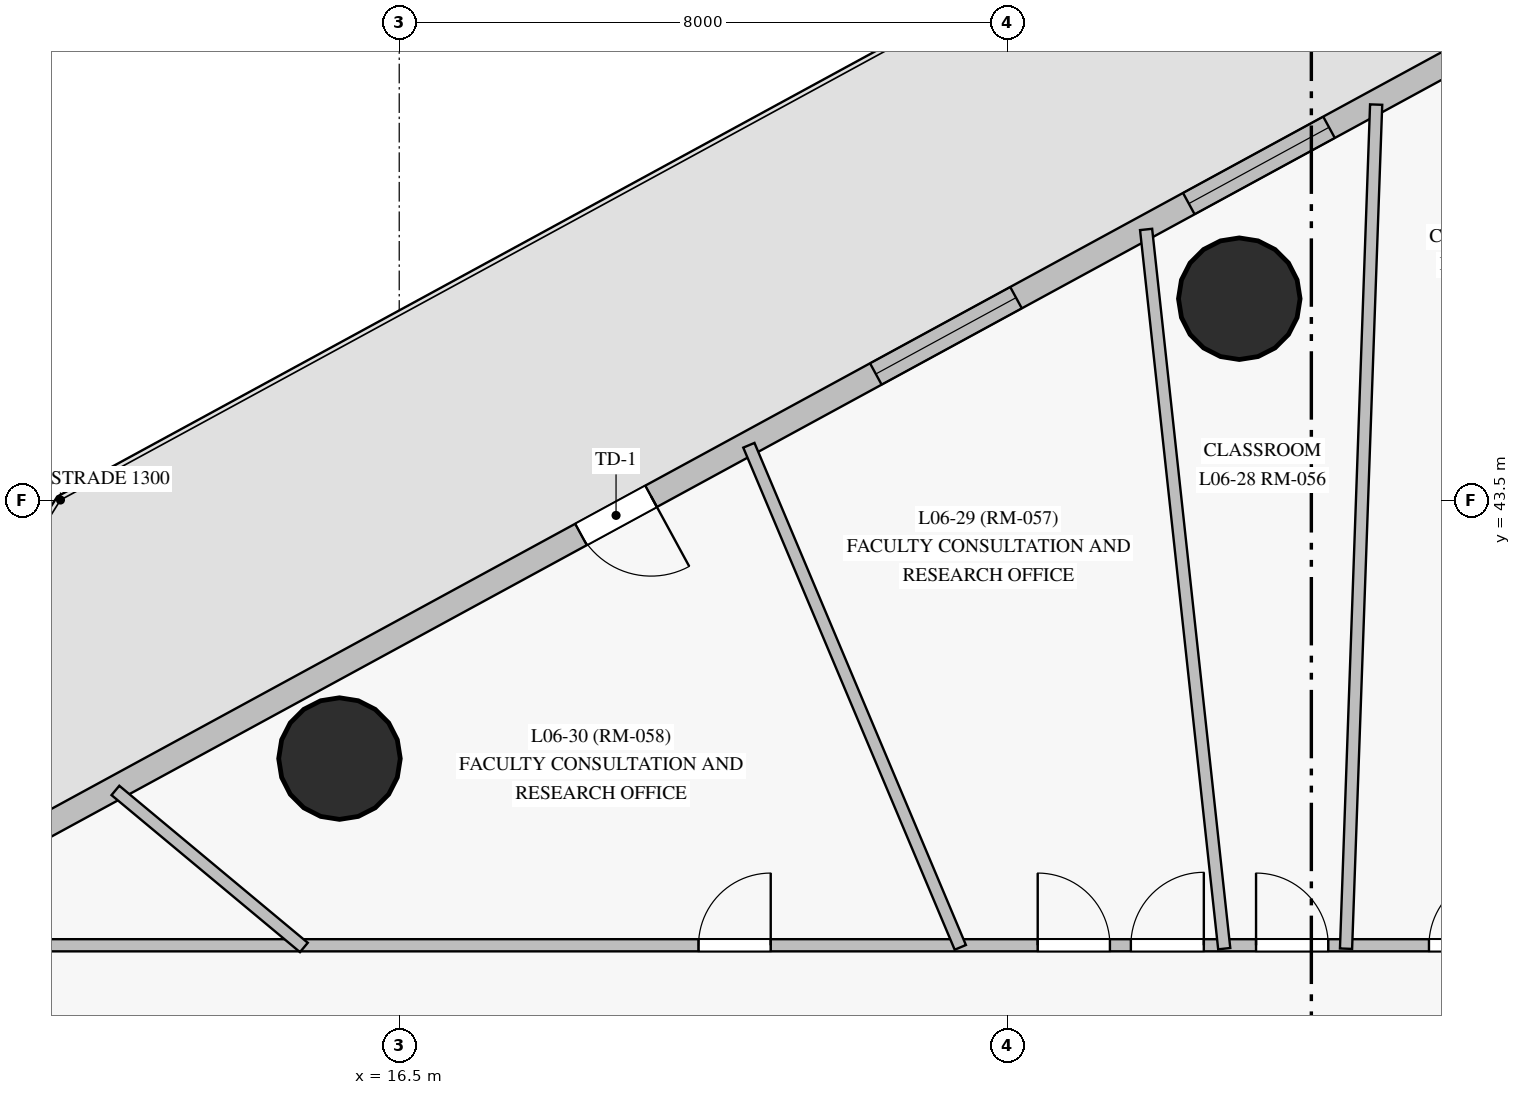
"""IFC4 building model, lengths in metres.
Left out: names, types, materials, properties, quantities, classifications, styles, units other than length and angle.
Written with IfcOpenShell. Run it as: python <this file> out.ifc"""

import sys

from ifc_helpers import new_model, si_unit, direction, frame, frame_2d, origin, origin_with_axes, origin_2d, place, context, subcontext, project, spatial, rectangle, circle, extrude, source, transform, mapped, element, fill, save


model = new_model("IFC4")
c1 = context("Model", 3, precision=1e-05, world=origin(), true_north=direction((0.0, 1.0)))
c2 = subcontext(c1, "Body", "Model", "MODEL_VIEW")
j1 = project(units=[si_unit("LENGTHUNIT", "METRE"), si_unit("PLANEANGLEUNIT", "RADIAN")], contexts=[c1])
p1 = place(None, origin())
s1 = spatial("IfcSite", under=j1, at=p1, CompositionType="ELEMENT")
p2 = place(p1, origin())
s2 = spatial("IfcBuilding", under=s1, at=p2, CompositionType="ELEMENT")
p3 = place(p2, frame((0.0, 0.0, 26.5)))
s3 = spatial("IfcBuildingStorey", under=s2, at=p3, CompositionType="ELEMENT", Elevation=26.5)
m1 = source(origin_with_axes(), c2, "Body", "SweptSolid", [
    extrude(circle(Radius=0.8, at=origin_2d()), origin(), (0.0, 0.0, 1.0), 3.6),
])
for number, where, z_axis, x_axis in (
    (1, (27.552, 46.156, 0.0), (0.0, 0.0, 1.0), (1.0, 0.0, 0.0)),
    (2, (15.714, 40.106, 0.0), (0.0, 0.0, 1.0), (1.0, 0.0, 0.0)),
):
    element("IfcColumn", number, at=place(p3, frame(where, z_axis=z_axis, x_axis=x_axis)), inside=s3, PredefinedType="COLUMN", context=c2, shape_type="MappedRepresentation", body=[
        mapped(m1, transform((0.0, 0.0, 0.0), scale=1.0)),
    ])
p4 = place(p3, frame((30.761, 49.515, 0.0), z_axis=(0.0, 0.0, 1.0), x_axis=(-0.878317970129, -0.478076922, 0.0)))
e3 = element("IfcWall", 3, at=p4, inside=s3, PredefinedType="SOLIDWALL", context=c2, shape_type="SweptSolid", body=[
    extrude(rectangle(XDim=25.977, YDim=0.32, at=frame_2d((12.989, 0.0))), origin(), (0.0, 0.0, 1.0), 3.35),
])
p5 = place(p4, frame((2.309, 0.0, 0.85)))
e4 = element("IfcOpeningElement", 4, at=p5, cuts=e3, PredefinedType="OPENING", context=c2, shape_type="SweptSolid", body=[
    extrude(rectangle(XDim=2.1, YDim=1.95, at=frame_2d((1.05, 0.975))), frame((0.0, 0.17, 0.0), z_axis=(0.0, -1.0, 0.0), x_axis=(1.0, 0.0, 0.0)), (0.0, 0.0, 1.0), 0.34),
])
p6 = place(p4, frame((6.998, 0.0, 0.85)))
e5 = element("IfcOpeningElement", 5, at=p6, cuts=e3, PredefinedType="OPENING", context=c2, shape_type="SweptSolid", body=[
    extrude(rectangle(XDim=2.1, YDim=1.95, at=frame_2d((1.05, 0.975))), frame((0.0, 0.17, 0.0), z_axis=(0.0, -1.0, 0.0), x_axis=(1.0, 0.0, 0.0)), (0.0, 0.0, 1.0), 0.34),
])
p7 = place(p4, frame((22.154, 0.0, 0.85)))
e6 = element("IfcOpeningElement", 6, at=p7, cuts=e3, PredefinedType="OPENING", context=c2, shape_type="SweptSolid", body=[
    extrude(rectangle(XDim=2.1, YDim=1.95, at=frame_2d((1.05, 0.975))), frame((0.0, 0.17, 0.0), z_axis=(0.0, -1.0, 0.0), x_axis=(1.0, 0.0, 0.0)), (0.0, 0.0, 1.0), 0.34),
])
p8 = place(p4, frame((12.464, 0.0, 0.0)))
e7 = element("IfcOpeningElement", 7, at=p8, cuts=e3, PredefinedType="OPENING", context=c2, shape_type="SweptSolid", body=[
    extrude(rectangle(XDim=1.05, YDim=2.12, at=frame_2d((0.525, 1.06))), frame((0.0, 0.17, 0.0), z_axis=(0.0, -1.0, 0.0), x_axis=(1.0, 0.0, 0.0)), (0.0, 0.0, 1.0), 0.34),
])
p9 = place(p3, frame((10.5, 37.65, 0.0), z_axis=(0.0, 0.0, 1.0), x_axis=(1.0, 0.0, 0.0)))
e8 = element("IfcWall", 8, at=p9, inside=s3, PredefinedType="PARTITIONING", context=c2, shape_type="SweptSolid", body=[
    extrude(rectangle(XDim=29.75, YDim=0.16, at=frame_2d((14.875, 0.0))), origin(), (0.0, 0.0, 1.0), 2.75),
])
p10 = place(p9, frame((26.906, 0.0, 0.0)))
e9 = element("IfcOpeningElement", 9, at=p10, cuts=e8, PredefinedType="OPENING", context=c2, shape_type="SweptSolid", body=[
    extrude(rectangle(XDim=0.95, YDim=2.15, at=frame_2d((0.475, 1.075))), frame((0.0, 0.09, 0.0), z_axis=(0.0, -1.0, 0.0), x_axis=(1.0, 0.0, 0.0)), (0.0, 0.0, 1.0), 0.18),
])
p11 = place(p9, frame((24.377, 0.0, 0.0)))
e10 = element("IfcOpeningElement", 10, at=p11, cuts=e8, PredefinedType="OPENING", context=c2, shape_type="SweptSolid", body=[
    extrude(rectangle(XDim=0.95, YDim=2.15, at=frame_2d((0.475, 1.075))), frame((0.0, 0.09, 0.0), z_axis=(0.0, -1.0, 0.0), x_axis=(1.0, 0.0, 0.0)), (0.0, 0.0, 1.0), 0.18),
])
p12 = place(p9, frame((21.812, 0.0, 0.0)))
e11 = element("IfcOpeningElement", 11, at=p12, cuts=e8, PredefinedType="OPENING", context=c2, shape_type="SweptSolid", body=[
    extrude(rectangle(XDim=0.96, YDim=2.15, at=frame_2d((0.48, 1.075))), frame((0.0, 0.09, 0.0), z_axis=(0.0, -1.0, 0.0), x_axis=(1.0, 0.0, 0.0)), (0.0, 0.0, 1.0), 0.18),
])
p13 = place(p9, frame((19.548, 0.0, 0.0)))
e12 = element("IfcOpeningElement", 12, at=p13, cuts=e8, PredefinedType="OPENING", context=c2, shape_type="SweptSolid", body=[
    extrude(rectangle(XDim=0.95, YDim=2.15, at=frame_2d((0.475, 1.075))), frame((0.0, 0.09, 0.0), z_axis=(0.0, -1.0, 0.0), x_axis=(1.0, 0.0, 0.0)), (0.0, 0.0, 1.0), 0.18),
])
p14 = place(p9, frame((17.272, 0.0, 0.0)))
e13 = element("IfcOpeningElement", 13, at=p14, cuts=e8, PredefinedType="OPENING", context=c2, shape_type="SweptSolid", body=[
    extrude(rectangle(XDim=0.95, YDim=2.15, at=frame_2d((0.475, 1.075))), frame((0.0, 0.09, 0.0), z_axis=(0.0, -1.0, 0.0), x_axis=(1.0, 0.0, 0.0)), (0.0, 0.0, 1.0), 0.18),
])
p15 = place(p9, frame((15.625, 0.0, 0.0)))
e14 = element("IfcOpeningElement", 14, at=p15, cuts=e8, PredefinedType="OPENING", context=c2, shape_type="SweptSolid", body=[
    extrude(rectangle(XDim=0.96, YDim=2.15, at=frame_2d((0.48, 1.075))), frame((0.0, 0.09, 0.0), z_axis=(0.0, -1.0, 0.0), x_axis=(1.0, 0.0, 0.0)), (0.0, 0.0, 1.0), 0.18),
])
p16 = place(p9, frame((14.4, 0.0, 0.0)))
e15 = element("IfcOpeningElement", 15, at=p16, cuts=e8, PredefinedType="OPENING", context=c2, shape_type="SweptSolid", body=[
    extrude(rectangle(XDim=0.95, YDim=2.15, at=frame_2d((0.475, 1.075))), frame((0.0, 0.09, 0.0), z_axis=(0.0, -1.0, 0.0), x_axis=(1.0, 0.0, 0.0)), (0.0, 0.0, 1.0), 0.18),
])
p17 = place(p9, frame((9.938, 0.0, 0.0)))
e16 = element("IfcOpeningElement", 16, at=p17, cuts=e8, PredefinedType="OPENING", context=c2, shape_type="SweptSolid", body=[
    extrude(rectangle(XDim=0.95, YDim=2.15, at=frame_2d((0.475, 1.075))), frame((0.0, 0.09, 0.0), z_axis=(0.0, -1.0, 0.0), x_axis=(1.0, 0.0, 0.0)), (0.0, 0.0, 1.0), 0.18),
])
p18 = place(p3, frame((28.956, 37.605, 0.0), z_axis=(0.0, 0.0, 1.0), x_axis=(0.035658616268, 0.999364029314, 0.0)))
e17 = element("IfcWall", 17, at=p18, inside=s3, PredefinedType="PARTITIONING", context=c2, shape_type="SweptSolid", body=[
    extrude(rectangle(XDim=11.112, YDim=0.16, at=frame_2d((5.556, 0.0))), origin(), (0.0, 0.0, 1.0), 3.35),
])
p19 = place(p3, frame((27.354, 37.605, 0.0), z_axis=(0.0, 0.0, 1.0), x_axis=(-0.108015642545, 0.99414919452, 0.0)))
e18 = element("IfcWall", 18, at=p19, inside=s3, PredefinedType="PARTITIONING", context=c2, shape_type="SweptSolid", body=[
    extrude(rectangle(XDim=9.518, YDim=0.16, at=frame_2d((4.759, 0.0))), origin(), (0.0, 0.0, 1.0), 2.7),
])
p20 = place(p3, frame((23.882, 37.622, 0.0), z_axis=(0.0, 0.0, 1.0), x_axis=(-0.388073750716, 0.92162832205, 0.0)))
e19 = element("IfcWall", 19, at=p20, inside=s3, PredefinedType="PARTITIONING", context=c2, shape_type="SweptSolid", body=[
    extrude(rectangle(XDim=7.167, YDim=0.16, at=frame_2d((3.584, 0.0))), origin(), (0.0, 0.0, 1.0), 3.35),
])
p21 = place(p3, frame((15.246, 37.621, 0.0), z_axis=(0.0, 0.0, 1.0), x_axis=(-0.768270881878, 0.640124872238, 0.0)))
e20 = element("IfcWall", 20, at=p21, inside=s3, PredefinedType="PARTITIONING", context=c2, shape_type="SweptSolid", body=[
    extrude(rectangle(XDim=3.227, YDim=0.16, at=frame_2d((1.614, 0.0))), origin(), (0.0, 0.0, 1.0), 3.35),
])
m2 = source(origin_with_axes(), c2, "Body", "SweptSolid", [
    extrude(rectangle(XDim=2.1, YDim=1.95, at=frame_2d((1.05, 0.975))), frame((0.0, 0.03, 0.0), z_axis=(0.0, -1.0, 0.0), x_axis=(1.0, 0.0, 0.0)), (0.0, 0.0, 1.0), 0.06),
])
p22 = place(p5, origin())
e21 = element("IfcWindow", 21, at=p22, inside=s3, PartitioningType="SINGLE_PANEL", PredefinedType="WINDOW", context=c2, shape_type="MappedRepresentation", body=[
    mapped(m2, transform((0.0, 0.0, 0.0), scale=1.0)),
])
fill(e4, e21)
p23 = place(p6, origin())
e22 = element("IfcWindow", 22, at=p23, inside=s3, PartitioningType="SINGLE_PANEL", PredefinedType="WINDOW", context=c2, shape_type="MappedRepresentation", body=[
    mapped(m2, transform((0.0, 0.0, 0.0), scale=1.0)),
])
fill(e5, e22)
m3 = source(origin_with_axes(), c2, "Body", "SweptSolid", [
    extrude(rectangle(XDim=1.05, YDim=2.12, at=frame_2d((0.525, 1.06))), frame((0.0, 0.025, 0.0), z_axis=(0.0, -1.0, 0.0), x_axis=(1.0, 0.0, 0.0)), (0.0, 0.0, 1.0), 0.05),
])
p24 = place(p8, origin())
e23 = element("IfcDoor", 23, at=p24, inside=s3, OperationType="SINGLE_SWING_LEFT", PredefinedType="DOOR", context=c2, shape_type="MappedRepresentation", body=[
    mapped(m3, transform((0.0, 0.0, 0.0), scale=1.0)),
])
fill(e7, e23)
m4 = source(origin_with_axes(), c2, "Body", "SweptSolid", [
    extrude(rectangle(XDim=0.95, YDim=2.15, at=frame_2d((0.475, 1.075))), frame((0.0, 0.025, 0.0), z_axis=(0.0, -1.0, 0.0), x_axis=(1.0, 0.0, 0.0)), (0.0, 0.0, 1.0), 0.05),
])
p25 = place(p13, origin())
e24 = element("IfcDoor", 24, at=p25, inside=s3, OperationType="SINGLE_SWING_RIGHT", PredefinedType="DOOR", context=c2, shape_type="MappedRepresentation", body=[
    mapped(m4, transform((0.0, 0.0, 0.0), scale=1.0)),
])
fill(e12, e24)
p26 = place(p14, origin())
e25 = element("IfcDoor", 25, at=p26, inside=s3, OperationType="SINGLE_SWING_LEFT", PredefinedType="DOOR", context=c2, shape_type="MappedRepresentation", body=[
    mapped(m4, transform((0.0, 0.0, 0.0), scale=1.0)),
])
fill(e13, e25)
m5 = source(origin_with_axes(), c2, "Body", "SweptSolid", [
    extrude(rectangle(XDim=0.96, YDim=2.15, at=frame_2d((0.48, 1.075))), frame((0.0, 0.025, 0.0), z_axis=(0.0, -1.0, 0.0), x_axis=(1.0, 0.0, 0.0)), (0.0, 0.0, 1.0), 0.05),
])
p27 = place(p15, origin())
e26 = element("IfcDoor", 26, at=p27, inside=s3, OperationType="SINGLE_SWING_RIGHT", PredefinedType="DOOR", context=c2, shape_type="MappedRepresentation", body=[
    mapped(m5, transform((0.0, 0.0, 0.0), scale=1.0)),
])
fill(e14, e26)
p28 = place(p16, origin())
e27 = element("IfcDoor", 27, at=p28, inside=s3, OperationType="SINGLE_SWING_LEFT", PredefinedType="DOOR", context=c2, shape_type="MappedRepresentation", body=[
    mapped(m4, transform((0.0, 0.0, 0.0), scale=1.0)),
])
fill(e15, e27)
p29 = place(p17, origin())
e28 = element("IfcDoor", 28, at=p29, inside=s3, OperationType="SINGLE_SWING_RIGHT", PredefinedType="DOOR", context=c2, shape_type="MappedRepresentation", body=[
    mapped(m4, transform((0.0, 0.0, 0.0), scale=1.0)),
])
fill(e16, e28)
save(model, sys.argv[1])
